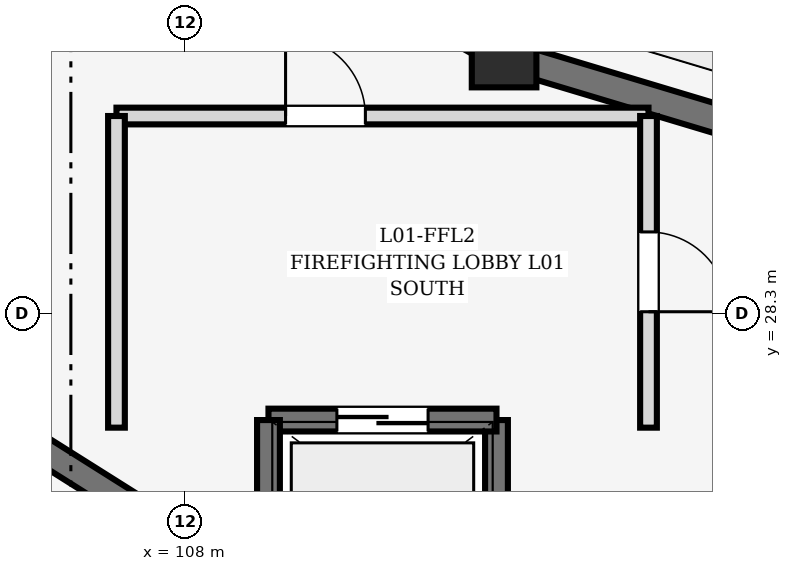
"""IFC4 building model, lengths in metres.
Left out: names, types, materials, properties, quantities, classifications, styles, units other than length and angle.
Written with IfcOpenShell. Run it as: python <this file> out.ifc"""

import sys

from ifc_helpers import new_model, si_unit, direction, frame, frame_2d, origin, origin_2d, place, context, subcontext, project, spatial, rectangle, extrude, element, fill, save


model = new_model("IFC4")
c1 = context("Model", 3, precision=1e-05, world=origin(), true_north=direction((0.0, 1.0)))
c2 = subcontext(c1, "Body", "Model", "MODEL_VIEW")
j1 = project(units=[si_unit("LENGTHUNIT", "METRE"), si_unit("PLANEANGLEUNIT", "RADIAN")], contexts=[c1])
p1 = place(None, origin())
s1 = spatial("IfcSite", under=j1, at=p1, CompositionType="ELEMENT")
p2 = place(p1, origin())
s2 = spatial("IfcBuilding", under=s1, at=p2, CompositionType="ELEMENT")
p3 = place(p2, origin())
s3 = spatial("IfcBuildingStorey", under=s2, at=p3, CompositionType="ELEMENT", Elevation=0.0)
p4 = place(p3, frame((112.2, 31.702, 0.0), z_axis=(0.0, 0.0, 1.0), x_axis=(1.0, 0.0, 0.0)))
e1 = element("IfcColumn", 1, at=p4, inside=s3, PredefinedType="COLUMN", context=c2, shape_type="SweptSolid", body=[
    extrude(rectangle(XDim=0.85, YDim=0.85, at=origin_2d()), origin(), (0.0, 0.0, 1.0), 5.4),
])
p5 = place(p3, frame((108.281, 33.881, 0.0), z_axis=(0.0, 0.0, 1.0), x_axis=(0.874014845015, -0.485899218659, 0.0)))
e2 = element("IfcWall", 2, at=p5, inside=s3, PredefinedType="SOLIDWALL", context=c2, shape_type="SweptSolid", body=[
    extrude(rectangle(XDim=4.125, YDim=0.38, at=frame_2d((2.062, 0.0))), origin(), (0.0, 0.0, 1.0), 5.12),
])
p6 = place(p3, frame((103.354, 28.252, 0.0), z_axis=(0.0, 0.0, 1.0), x_axis=(0.846151979506, -0.532941673712, 0.0)))
e3 = element("IfcWall", 3, at=p6, inside=s3, PredefinedType="SHEAR", context=c2, shape_type="SweptSolid", body=[
    extrude(rectangle(XDim=5.9, YDim=0.35, at=frame_2d((2.95, 0.0))), origin(), (0.0, 0.0, 1.0), 5.12),
])
p7 = place(p3, frame((112.545, 31.599, 0.0), z_axis=(0.0, 0.0, 1.0), x_axis=(0.95780895372, -0.287405650907, 0.0)))
e4 = element("IfcWall", 4, at=p7, inside=s3, PredefinedType="SOLIDWALL", context=c2, shape_type="SweptSolid", body=[
    extrude(rectangle(XDim=4.265, YDim=0.38, at=frame_2d((2.133, 0.0))), origin(), (0.0, 0.0, 1.0), 5.12),
])
p8 = place(p3, frame((112.1, 26.9, 0.0), z_axis=(0.0, 0.0, 1.0), x_axis=(0.0, -1.0, 0.0)))
e5 = element("IfcWall", 5, at=p8, inside=s3, PredefinedType="SHEAR", context=c2, shape_type="SweptSolid", body=[
    extrude(rectangle(XDim=2.2, YDim=0.3, at=frame_2d((1.1, 0.0))), origin(), (0.0, 0.0, 1.0), 5.14),
])
p9 = place(p3, frame((109.1, 26.9, 0.0), z_axis=(0.0, 0.0, 1.0), x_axis=(1.0, 0.0, 0.0)))
e6 = element("IfcWall", 6, at=p9, inside=s3, PredefinedType="SHEAR", context=c2, shape_type="SweptSolid", body=[
    extrude(rectangle(XDim=3.0, YDim=0.3, at=frame_2d((1.5, 0.0))), origin(), (0.0, 0.0, 1.0), 5.14),
])
p10 = place(p9, frame((0.9, 0.0, 0.0)))
e7 = element("IfcOpeningElement", 7, at=p10, cuts=e6, PredefinedType="OPENING", context=c2, shape_type="SweptSolid", body=[
    extrude(rectangle(XDim=1.2, YDim=2.15, at=frame_2d((0.6, 1.075))), frame((0.0, 0.162, 0.0), z_axis=(0.0, -1.0, 0.0), x_axis=(1.0, 0.0, 0.0)), (0.0, 0.0, 1.0), 0.324),
])
p11 = place(p3, frame((109.1, 24.7, 0.0), z_axis=(0.0, 0.0, 1.0), x_axis=(0.0, 1.0, 0.0)))
e8 = element("IfcWall", 8, at=p11, inside=s3, PredefinedType="SHEAR", context=c2, shape_type="SweptSolid", body=[
    extrude(rectangle(XDim=2.2, YDim=0.3, at=frame_2d((1.1, 0.0))), origin(), (0.0, 0.0, 1.0), 5.12),
])
p12 = place(p3, frame((107.1, 30.9, 0.0), z_axis=(0.0, 0.0, 1.0), x_axis=(1.0, 0.0, 0.0)))
e9 = element("IfcWall", 9, at=p12, inside=s3, PredefinedType="SOLIDWALL", context=c2, shape_type="SweptSolid", body=[
    extrude(rectangle(XDim=7.0, YDim=0.22, at=frame_2d((3.5, 0.0))), origin(), (0.0, 0.0, 1.0), 5.125),
])
p13 = place(p12, frame((2.225, 0.0, 0.0)))
e10 = element("IfcOpeningElement", 10, at=p13, cuts=e9, PredefinedType="OPENING", context=c2, shape_type="SweptSolid", body=[
    extrude(rectangle(XDim=1.05, YDim=2.15, at=frame_2d((0.525, 1.075))), frame((0.0, 0.122, 0.0), z_axis=(0.0, -1.0, 0.0), x_axis=(1.0, 0.0, 0.0)), (0.0, 0.0, 1.0), 0.244),
])
p14 = place(p3, frame((107.1, 26.8, 0.0), z_axis=(0.0, 0.0, 1.0), x_axis=(0.0, 1.0, 0.0)))
e11 = element("IfcWall", 11, at=p14, inside=s3, PredefinedType="SOLIDWALL", context=c2, shape_type="SweptSolid", body=[
    extrude(rectangle(XDim=4.1, YDim=0.22, at=frame_2d((2.05, 0.0))), origin(), (0.0, 0.0, 1.0), 5.125),
])
p15 = place(p3, frame((114.1, 30.9, 0.0), z_axis=(0.0, 0.0, 1.0), x_axis=(0.0, -1.0, 0.0)))
e12 = element("IfcWall", 12, at=p15, inside=s3, PredefinedType="SOLIDWALL", context=c2, shape_type="SweptSolid", body=[
    extrude(rectangle(XDim=4.1, YDim=0.22, at=frame_2d((2.05, 0.0))), origin(), (0.0, 0.0, 1.0), 5.125),
])
p16 = place(p15, frame((1.525, 0.0, 0.0)))
e13 = element("IfcOpeningElement", 13, at=p16, cuts=e12, PredefinedType="OPENING", context=c2, shape_type="SweptSolid", body=[
    extrude(rectangle(XDim=1.05, YDim=2.15, at=frame_2d((0.525, 1.075))), frame((0.0, 0.122, 0.0), z_axis=(0.0, -1.0, 0.0), x_axis=(1.0, 0.0, 0.0)), (0.0, 0.0, 1.0), 0.244),
])
p17 = place(p10, origin())
e14 = element("IfcDoor", 14, at=p17, inside=s3, OperationType="DOUBLE_DOOR_SLIDING", PredefinedType="DOOR", context=c2, shape_type="SweptSolid", body=[
    extrude(rectangle(XDim=1.2, YDim=2.15, at=frame_2d((0.6, 1.075))), frame((0.0, 0.025, 0.0), z_axis=(0.0, -1.0, 0.0), x_axis=(1.0, 0.0, 0.0)), (0.0, 0.0, 1.0), 0.05),
])
fill(e7, e14)
p18 = place(p13, origin())
e15 = element("IfcDoor", 15, at=p18, inside=s3, OperationType="SINGLE_SWING_LEFT", PredefinedType="DOOR", context=c2, shape_type="SweptSolid", body=[
    extrude(rectangle(XDim=1.05, YDim=2.15, at=frame_2d((0.525, 1.075))), frame((0.0, 0.025, 0.0), z_axis=(0.0, -1.0, 0.0), x_axis=(1.0, 0.0, 0.0)), (0.0, 0.0, 1.0), 0.05),
])
fill(e10, e15)
p19 = place(p16, origin())
e16 = element("IfcDoor", 16, at=p19, inside=s3, OperationType="SINGLE_SWING_RIGHT", PredefinedType="DOOR", context=c2, shape_type="SweptSolid", body=[
    extrude(rectangle(XDim=1.05, YDim=2.15, at=frame_2d((0.525, 1.075))), frame((0.0, 0.025, 0.0), z_axis=(0.0, -1.0, 0.0), x_axis=(1.0, 0.0, 0.0)), (0.0, 0.0, 1.0), 0.05),
])
fill(e13, e16)
save(model, sys.argv[1])
